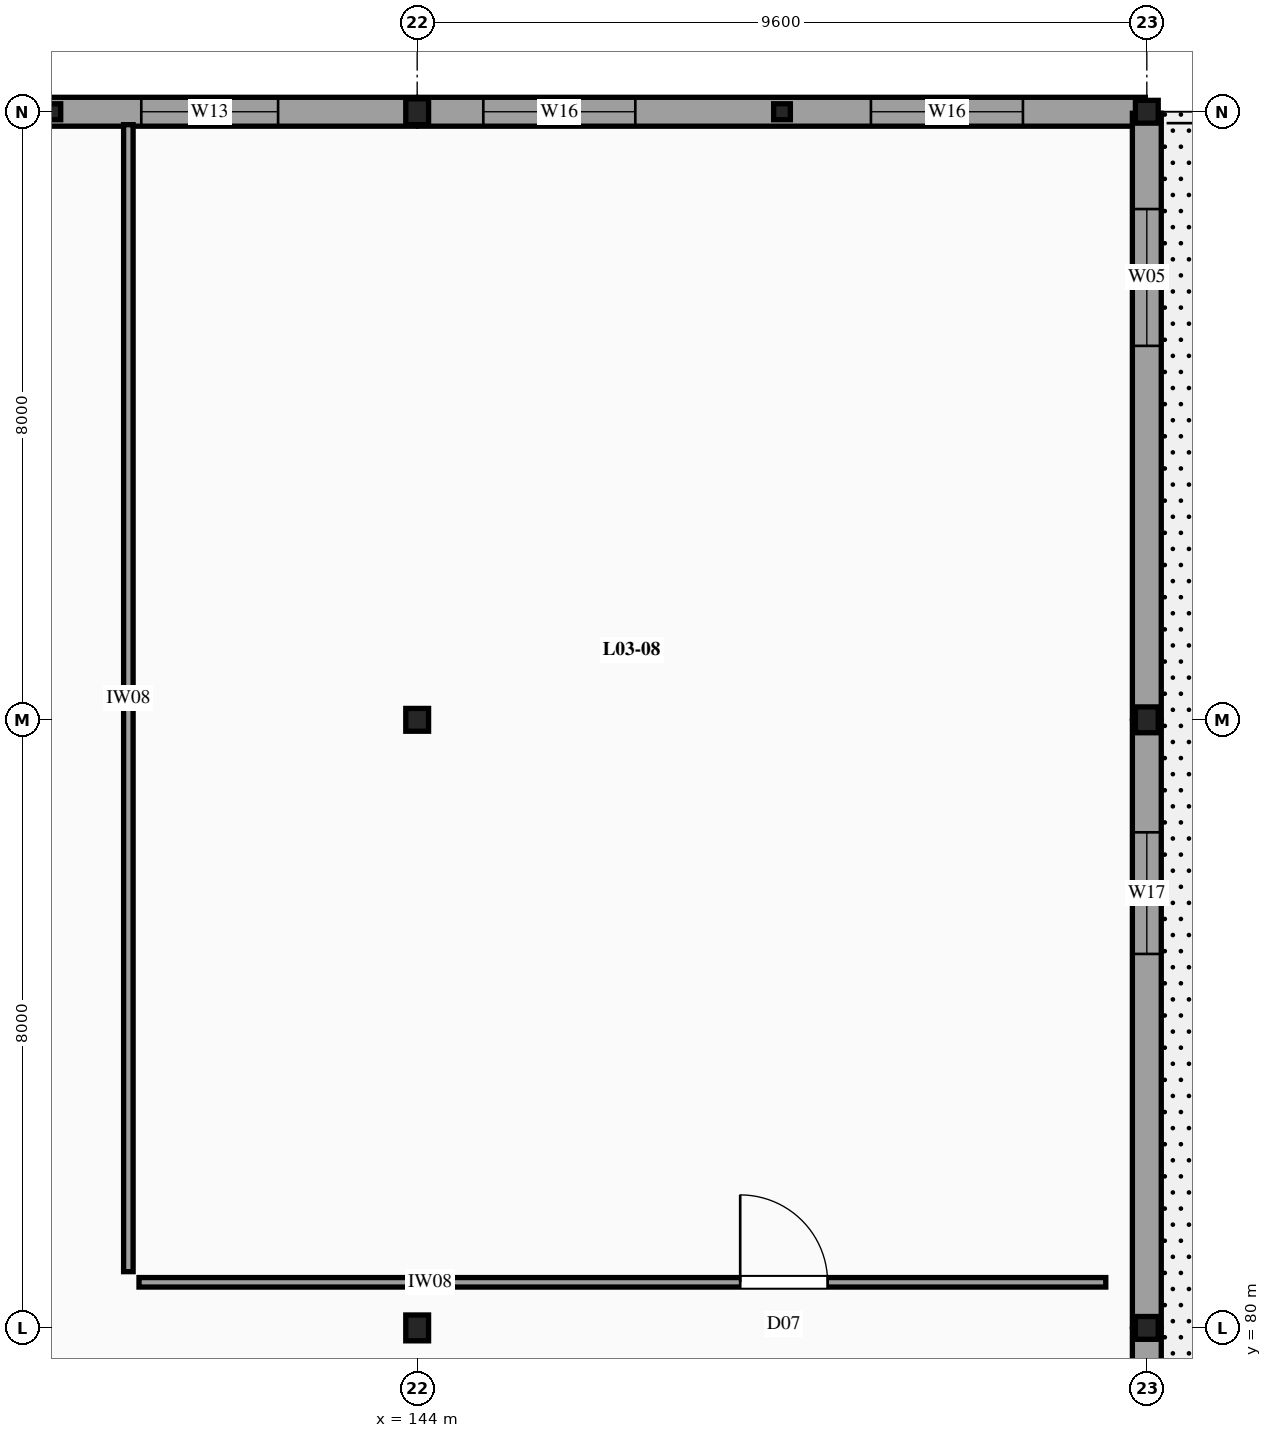
"""IFC4 building model, lengths in metres.
Left out: names, types, materials, properties, quantities, classifications, styles, units other than length and angle.
Written with IfcOpenShell. Run it as: python <this file> out.ifc"""

import sys

from ifc_helpers import new_model, si_unit, direction, frame, frame_2d, origin, origin_2d, place, context, subcontext, project, spatial, rectangle, i_section, extrude, element, fill, save


model = new_model("IFC4")
c1 = context("Model", 3, precision=1e-05, world=origin(), true_north=direction((0.0, 1.0)))
c2 = subcontext(c1, "Body", "Model", "MODEL_VIEW")
j1 = project(units=[si_unit("LENGTHUNIT", "METRE"), si_unit("PLANEANGLEUNIT", "RADIAN")], contexts=[c1])
p1 = place(None, origin())
s1 = spatial("IfcSite", under=j1, at=p1, CompositionType="ELEMENT")
p2 = place(p1, origin())
s2 = spatial("IfcBuilding", under=s1, at=p2, CompositionType="ELEMENT")
p3 = place(p2, frame((0.0, 0.0, 12.9)))
s3 = spatial("IfcBuildingStorey", under=s2, at=p3, CompositionType="ELEMENT", Elevation=12.9)
p4 = place(p3, frame((144.0, 80.0, -0.26), z_axis=(0.0, 0.0, 1.0), x_axis=(1.0, 0.0, 0.0)))
e1 = element("IfcColumn", 1, at=p4, inside=s3, PredefinedType="COLUMN", context=c2, shape_type="SweptSolid", body=[
    extrude(i_section(OverallWidth=0.3, OverallDepth=0.34, WebThickness=0.012, FlangeThickness=0.021, FilletRadius=0.027, at=origin_2d()), origin(), (0.0, 0.0, 1.0), 4.48),
])
p5 = place(p3, frame((144.0, 88.0, -0.26), z_axis=(0.0, 0.0, 1.0), x_axis=(1.0, 0.0, 0.0)))
e2 = element("IfcColumn", 2, at=p5, inside=s3, PredefinedType="COLUMN", context=c2, shape_type="SweptSolid", body=[
    extrude(i_section(OverallWidth=0.3, OverallDepth=0.3, WebThickness=0.011, FlangeThickness=0.019, FilletRadius=0.027, at=origin_2d()), origin(), (0.0, 0.0, 1.0), 4.48),
])
p6 = place(p3, frame((144.0, 96.0, -0.26), z_axis=(0.0, 0.0, 1.0), x_axis=(1.0, 0.0, 0.0)))
e3 = element("IfcColumn", 3, at=p6, inside=s3, PredefinedType="COLUMN", context=c2, shape_type="SweptSolid", body=[
    extrude(i_section(OverallWidth=0.3, OverallDepth=0.34, WebThickness=0.012, FlangeThickness=0.021, FilletRadius=0.027, at=origin_2d()), origin(), (0.0, 0.0, 1.0), 4.48),
])
p7 = place(p3, frame((153.6, 80.0, -0.26), z_axis=(0.0, 0.0, 1.0), x_axis=(1.0, 0.0, 0.0)))
e4 = element("IfcColumn", 4, at=p7, inside=s3, PredefinedType="COLUMN", context=c2, shape_type="SweptSolid", body=[
    extrude(i_section(OverallWidth=0.3, OverallDepth=0.3, WebThickness=0.011, FlangeThickness=0.019, FilletRadius=0.027, at=origin_2d()), origin(), (0.0, 0.0, 1.0), 4.48),
])
p8 = place(p3, frame((153.6, 88.0, -0.26), z_axis=(0.0, 0.0, 1.0), x_axis=(1.0, 0.0, 0.0)))
e5 = element("IfcColumn", 5, at=p8, inside=s3, PredefinedType="COLUMN", context=c2, shape_type="SweptSolid", body=[
    extrude(i_section(OverallWidth=0.3, OverallDepth=0.34, WebThickness=0.012, FlangeThickness=0.021, FilletRadius=0.027, at=origin_2d()), origin(), (0.0, 0.0, 1.0), 4.48),
])
p9 = place(p3, frame((153.6, 96.0, -0.26), z_axis=(0.0, 0.0, 1.0), x_axis=(1.0, 0.0, 0.0)))
e6 = element("IfcColumn", 6, at=p9, inside=s3, PredefinedType="COLUMN", context=c2, shape_type="SweptSolid", body=[
    extrude(i_section(OverallWidth=0.3, OverallDepth=0.3, WebThickness=0.011, FlangeThickness=0.019, FilletRadius=0.027, at=origin_2d()), origin(), (0.0, 0.0, 1.0), 4.48),
])
for number, where, z_axis, x_axis in (
    (7, (139.2, 96.0, -0.26), (0.0, 0.0, 1.0), (1.0, 0.0, 0.0)),
    (8, (148.8, 96.0, -0.26), (0.0, 0.0, 1.0), (1.0, 0.0, 0.0)),
):
    element("IfcColumn", number, at=place(p3, frame(where, z_axis=z_axis, x_axis=x_axis)), inside=s3, PredefinedType="PILASTER", context=c2, shape_type="SweptSolid", body=[
        extrude(i_section(OverallWidth=0.22, OverallDepth=0.21, WebThickness=0.007, FlangeThickness=0.011, FilletRadius=0.018, at=origin_2d()), origin(), (0.0, 0.0, 1.0), 4.48),
    ])
p10 = place(p3, frame((134.42, 96.0, 0.0), z_axis=(0.0, 0.0, 1.0), x_axis=(1.0, 0.0, 0.0)))
e9 = element("IfcWall", 9, at=p10, inside=s3, PredefinedType="SOLIDWALL", context=c2, shape_type="SweptSolid", body=[
    extrude(rectangle(XDim=9.56, YDim=0.38, at=frame_2d((4.78, 0.0))), origin(), (0.0, 0.0, 1.0), 3.54),
])
p11 = place(p10, frame((0.85, 0.0, 0.72)))
e10 = element("IfcOpeningElement", 10, at=p11, cuts=e9, PredefinedType="OPENING", context=c2, shape_type="SweptSolid", body=[
    extrude(rectangle(XDim=1.8, YDim=1.6, at=frame_2d((0.9, 0.8))), frame((0.0, 0.2, 0.0), z_axis=(0.0, -1.0, 0.0), x_axis=(1.0, 0.0, 0.0)), (0.0, 0.0, 1.0), 0.4),
])
p12 = place(p10, frame((5.95, 0.0, 0.72)))
e11 = element("IfcOpeningElement", 11, at=p12, cuts=e9, PredefinedType="OPENING", context=c2, shape_type="SweptSolid", body=[
    extrude(rectangle(XDim=1.8, YDim=1.6, at=frame_2d((0.9, 0.8))), frame((0.0, 0.2, 0.0), z_axis=(0.0, -1.0, 0.0), x_axis=(1.0, 0.0, 0.0)), (0.0, 0.0, 1.0), 0.4),
])
p13 = place(p3, frame((144.02, 96.0, 0.0), z_axis=(0.0, 0.0, 1.0), x_axis=(1.0, 0.0, 0.0)))
e12 = element("IfcWall", 12, at=p13, inside=s3, PredefinedType="SOLIDWALL", context=c2, shape_type="SweptSolid", body=[
    extrude(rectangle(XDim=9.56, YDim=0.38, at=frame_2d((4.78, 0.0))), origin(), (0.0, 0.0, 1.0), 3.54),
])
p14 = place(p13, frame((0.85, 0.0, 0.85)))
e13 = element("IfcOpeningElement", 13, at=p14, cuts=e12, PredefinedType="OPENING", context=c2, shape_type="SweptSolid", body=[
    extrude(rectangle(XDim=2.0, YDim=2.2, at=frame_2d((1.0, 1.1))), frame((0.0, 0.2, 0.0), z_axis=(0.0, -1.0, 0.0), x_axis=(1.0, 0.0, 0.0)), (0.0, 0.0, 1.0), 0.4),
])
p15 = place(p13, frame((5.95, 0.0, 0.85)))
e14 = element("IfcOpeningElement", 14, at=p15, cuts=e12, PredefinedType="OPENING", context=c2, shape_type="SweptSolid", body=[
    extrude(rectangle(XDim=2.0, YDim=2.2, at=frame_2d((1.0, 1.1))), frame((0.0, 0.2, 0.0), z_axis=(0.0, -1.0, 0.0), x_axis=(1.0, 0.0, 0.0)), (0.0, 0.0, 1.0), 0.4),
])
p16 = place(p3, frame((153.6, 72.02, 0.0), z_axis=(0.0, 0.0, 1.0), x_axis=(0.0, 1.0, 0.0)))
e15 = element("IfcWall", 15, at=p16, inside=s3, PredefinedType="SOLIDWALL", context=c2, shape_type="SweptSolid", body=[
    extrude(rectangle(XDim=7.96, YDim=0.38, at=frame_2d((3.98, 0.0))), origin(), (0.0, 0.0, 1.0), 3.54),
])
p17 = place(p16, frame((2.8, 0.0, 0.0)))
e16 = element("IfcOpeningElement", 16, at=p17, cuts=e15, PredefinedType="OPENING", context=c2, shape_type="SweptSolid", body=[
    extrude(rectangle(XDim=1.35, YDim=2.2, at=frame_2d((0.675, 1.1))), frame((0.0, 0.2, 0.0), z_axis=(0.0, -1.0, 0.0), x_axis=(1.0, 0.0, 0.0)), (0.0, 0.0, 1.0), 0.4),
])
p18 = place(p3, frame((153.6, 80.02, 0.0), z_axis=(0.0, 0.0, 1.0), x_axis=(0.0, 1.0, 0.0)))
e17 = element("IfcWall", 17, at=p18, inside=s3, PredefinedType="SOLIDWALL", context=c2, shape_type="SweptSolid", body=[
    extrude(rectangle(XDim=7.96, YDim=0.38, at=frame_2d((3.98, 0.0))), origin(), (0.0, 0.0, 1.0), 3.54),
])
p19 = place(p18, frame((4.9, 0.0, 0.9)))
e18 = element("IfcOpeningElement", 18, at=p19, cuts=e17, PredefinedType="OPENING", context=c2, shape_type="SweptSolid", body=[
    extrude(rectangle(XDim=1.6, YDim=2.0, at=frame_2d((0.8, 1.0))), frame((0.0, 0.2, 0.0), z_axis=(0.0, -1.0, 0.0), x_axis=(1.0, 0.0, 0.0)), (0.0, 0.0, 1.0), 0.4),
])
p20 = place(p3, frame((153.6, 88.02, 0.0), z_axis=(0.0, 0.0, 1.0), x_axis=(0.0, 1.0, 0.0)))
e19 = element("IfcWall", 19, at=p20, inside=s3, PredefinedType="SOLIDWALL", context=c2, shape_type="SweptSolid", body=[
    extrude(rectangle(XDim=7.96, YDim=0.38, at=frame_2d((3.98, 0.0))), origin(), (0.0, 0.0, 1.0), 3.54),
])
p21 = place(p20, frame((4.9, 0.0, 0.9)))
e20 = element("IfcOpeningElement", 20, at=p21, cuts=e19, PredefinedType="OPENING", context=c2, shape_type="SweptSolid", body=[
    extrude(rectangle(XDim=1.8, YDim=2.4, at=frame_2d((0.9, 1.2))), frame((0.0, 0.2, 0.0), z_axis=(0.0, -1.0, 0.0), x_axis=(1.0, 0.0, 0.0)), (0.0, 0.0, 1.0), 0.4),
])
p22 = place(p3, frame((140.34, 80.6, 0.0), z_axis=(0.0, 0.0, 1.0), x_axis=(1.0, 0.0, 0.0)))
e21 = element("IfcWall", 21, at=p22, inside=s3, PredefinedType="PARTITIONING", context=c2, shape_type="SweptSolid", body=[
    extrude(rectangle(XDim=12.72, YDim=0.125, at=frame_2d((6.36, 0.0))), origin(), (0.0, 0.0, 1.0), 3.38),
])
p23 = place(p22, frame((7.91, 0.0, 0.0)))
e22 = element("IfcOpeningElement", 22, at=p23, cuts=e21, PredefinedType="OPENING", context=c2, shape_type="SweptSolid", body=[
    extrude(rectangle(XDim=1.15, YDim=2.2, at=frame_2d((0.575, 1.1))), frame((0.0, 0.073, 0.0), z_axis=(0.0, -1.0, 0.0), x_axis=(1.0, 0.0, 0.0)), (0.0, 0.0, 1.0), 0.145),
])
p24 = place(p3, frame((140.2, 80.74, 0.0), z_axis=(0.0, 0.0, 1.0), x_axis=(0.0, 1.0, 0.0)))
e23 = element("IfcWall", 23, at=p24, inside=s3, PredefinedType="PARTITIONING", context=c2, shape_type="SweptSolid", body=[
    extrude(rectangle(XDim=15.09, YDim=0.125, at=frame_2d((7.545, 0.0))), origin(), (0.0, 0.0, 1.0), 3.38),
])
p25 = place(p12, origin())
e24 = element("IfcWindow", 24, at=p25, inside=s3, PartitioningType="SINGLE_PANEL", PredefinedType="WINDOW", context=c2, shape_type="SweptSolid", body=[
    extrude(rectangle(XDim=1.8, YDim=1.6, at=frame_2d((0.9, 0.8))), frame((0.0, 0.03, 0.0), z_axis=(0.0, -1.0, 0.0), x_axis=(1.0, 0.0, 0.0)), (0.0, 0.0, 1.0), 0.06),
])
fill(e11, e24)
p26 = place(p14, origin())
e25 = element("IfcWindow", 25, at=p26, inside=s3, PartitioningType="SINGLE_PANEL", PredefinedType="WINDOW", context=c2, shape_type="SweptSolid", body=[
    extrude(rectangle(XDim=2.0, YDim=2.2, at=frame_2d((1.0, 1.1))), frame((0.0, 0.03, 0.0), z_axis=(0.0, -1.0, 0.0), x_axis=(1.0, 0.0, 0.0)), (0.0, 0.0, 1.0), 0.06),
])
fill(e13, e25)
p27 = place(p15, origin())
e26 = element("IfcWindow", 26, at=p27, inside=s3, PartitioningType="SINGLE_PANEL", PredefinedType="WINDOW", context=c2, shape_type="SweptSolid", body=[
    extrude(rectangle(XDim=2.0, YDim=2.2, at=frame_2d((1.0, 1.1))), frame((0.0, 0.03, 0.0), z_axis=(0.0, -1.0, 0.0), x_axis=(1.0, 0.0, 0.0)), (0.0, 0.0, 1.0), 0.06),
])
fill(e14, e26)
p28 = place(p19, origin())
e27 = element("IfcWindow", 27, at=p28, inside=s3, PartitioningType="SINGLE_PANEL", PredefinedType="WINDOW", context=c2, shape_type="SweptSolid", body=[
    extrude(rectangle(XDim=1.6, YDim=2.0, at=frame_2d((0.8, 1.0))), frame((0.0, 0.03, 0.0), z_axis=(0.0, -1.0, 0.0), x_axis=(1.0, 0.0, 0.0)), (0.0, 0.0, 1.0), 0.06),
])
fill(e18, e27)
p29 = place(p21, origin())
e28 = element("IfcWindow", 28, at=p29, inside=s3, PartitioningType="SINGLE_PANEL", PredefinedType="WINDOW", context=c2, shape_type="SweptSolid", body=[
    extrude(rectangle(XDim=1.8, YDim=2.4, at=frame_2d((0.9, 1.2))), frame((0.0, 0.03, 0.0), z_axis=(0.0, -1.0, 0.0), x_axis=(1.0, 0.0, 0.0)), (0.0, 0.0, 1.0), 0.06),
])
fill(e20, e28)
p30 = place(p23, origin())
e29 = element("IfcDoor", 29, at=p30, inside=s3, OperationType="SINGLE_SWING_LEFT", PredefinedType="DOOR", context=c2, shape_type="SweptSolid", body=[
    extrude(rectangle(XDim=1.15, YDim=2.2, at=frame_2d((0.575, 1.1))), frame((0.0, 0.025, 0.0), z_axis=(0.0, -1.0, 0.0), x_axis=(1.0, 0.0, 0.0)), (0.0, 0.0, 1.0), 0.05),
])
fill(e22, e29)
save(model, sys.argv[1])
